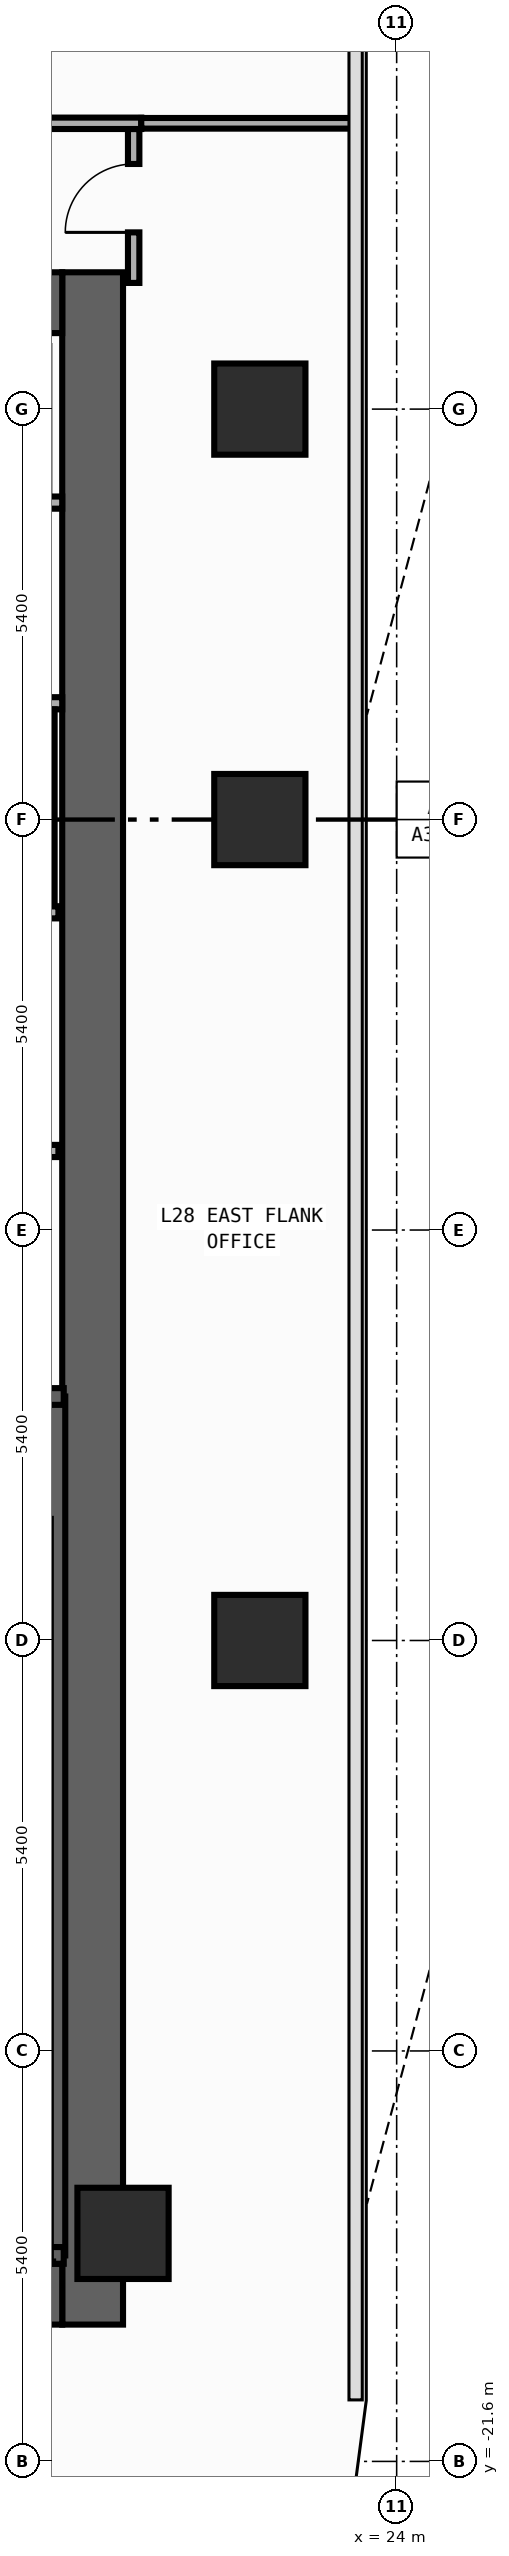
"""IFC4 building model, lengths in metres.
Left out: names, types, materials, properties, quantities, classifications, styles, units other than length and angle.
Written with IfcOpenShell. Run it as: python <this file> out.ifc"""

import sys

from ifc_helpers import new_model, si_unit, direction, frame, frame_2d, origin, origin_2d, place, context, subcontext, project, spatial, rectangle, extrude, element, fill, save


model = new_model("IFC4")
c1 = context("Model", 3, precision=1e-05, world=origin(), true_north=direction((0.0, 1.0)))
c2 = subcontext(c1, "Body", "Model", "MODEL_VIEW")
j1 = project(units=[si_unit("LENGTHUNIT", "METRE"), si_unit("PLANEANGLEUNIT", "RADIAN")], contexts=[c1])
p1 = place(None, origin())
s1 = spatial("IfcSite", under=j1, at=p1, CompositionType="ELEMENT")
p2 = place(p1, origin())
s2 = spatial("IfcBuilding", under=s1, at=p2, CompositionType="ELEMENT")
p3 = place(p2, frame((0.0, 0.0, 122.6)))
s3 = spatial("IfcBuildingStorey", under=s2, at=p3, CompositionType="ELEMENT", Elevation=122.6)
p4 = place(p3, frame((20.0, -19.8, 0.0), z_axis=(0.0, 0.0, 1.0), x_axis=(0.0, 1.0, 0.0)))
e1 = element("IfcWall", 1, at=p4, inside=s3, PredefinedType="SHEAR", context=c2, shape_type="SweptSolid", body=[
    extrude(rectangle(XDim=27.0, YDim=0.8, at=frame_2d((13.5, 0.0))), origin(), (0.0, 0.0, 1.0), 3.94),
])
for number, where, z_axis, x_axis in (
    (2, (12.8, -19.4, 0.0), (0.0, 0.0, 1.0), (1.0, 0.0, 0.0)),
    (3, (12.8, 6.8, 0.0), (0.0, 0.0, 1.0), (1.0, 0.0, 0.0)),
):
    element("IfcWall", number, at=place(p3, frame(where, z_axis=z_axis, x_axis=x_axis)), inside=s3, PredefinedType="SHEAR", context=c2, shape_type="SweptSolid", body=[
        extrude(rectangle(XDim=6.8, YDim=0.8, at=frame_2d((3.4, 0.0))), origin(), (0.0, 0.0, 1.0), 3.94),
    ])
p5 = place(p3, frame((19.53, -18.89, 0.0), z_axis=(0.0, 0.0, 1.0), x_axis=(0.0, 1.0, 0.0)))
e4 = element("IfcWall", 4, at=p5, inside=s3, PredefinedType="SHEAR", context=c2, shape_type="SweptSolid", body=[
    extrude(rectangle(XDim=11.3, YDim=0.22, at=frame_2d((5.65, 0.0))), origin(), (0.0, 0.0, 1.0), 3.94),
])
p6 = place(p3, frame((15.705, -18.89, 0.0), z_axis=(0.0, 0.0, 1.0), x_axis=(1.0, 0.0, 0.0)))
e5 = element("IfcWall", 5, at=p6, inside=s3, PredefinedType="SHEAR", context=c2, shape_type="SweptSolid", body=[
    extrude(rectangle(XDim=3.915, YDim=0.22, at=frame_2d((1.958, 0.0))), origin(), (0.0, 0.0, 1.0), 3.94),
])
p7 = place(p3, frame((19.62, -7.59, 0.0), z_axis=(0.0, 0.0, 1.0), x_axis=(-1.0, 0.0, 0.0)))
e6 = element("IfcWall", 6, at=p7, inside=s3, PredefinedType="SHEAR", context=c2, shape_type="SweptSolid", body=[
    extrude(rectangle(XDim=3.915, YDim=0.22, at=frame_2d((1.958, 0.0))), origin(), (0.0, 0.0, 1.0), 3.94),
])
p8 = place(p7, frame((1.08, 0.0, 0.0)))
e7 = element("IfcOpeningElement", 7, at=p8, cuts=e6, PredefinedType="OPENING", context=c2, shape_type="SweptSolid", body=[
    extrude(rectangle(XDim=1.1, YDim=2.2, at=frame_2d((0.55, 1.1))), frame((0.0, 0.12, 0.0), z_axis=(0.0, -1.0, 0.0), x_axis=(1.0, 0.0, 0.0)), (0.0, 0.0, 1.0), 0.24),
])
for number, where, z_axis, x_axis in (
    (8, (20.4, -18.6, 0.0), (0.0, 0.0, 1.0), (1.0, 0.0, 0.0)),
    (9, (22.2, -10.8, 0.0), (0.0, 0.0, 1.0), (1.0, 0.0, 0.0)),
    (10, (22.2, 0.0, 0.0), (0.0, 0.0, 1.0), (1.0, 0.0, 0.0)),
    (11, (22.2, 5.4, 0.0), (0.0, 0.0, 1.0), (1.0, 0.0, 0.0)),
):
    element("IfcColumn", number, at=place(p3, frame(where, z_axis=z_axis, x_axis=x_axis)), inside=s3, PredefinedType="COLUMN", context=c2, shape_type="SweptSolid", body=[
        extrude(rectangle(XDim=1.2, YDim=1.2, at=origin_2d()), origin(), (0.0, 0.0, 1.0), 4.2),
    ])
p9 = place(p3, frame((15.75, -4.36, 0.0), z_axis=(0.0, 0.0, 1.0), x_axis=(1.0, 0.0, 0.0)))
e12 = element("IfcWall", 12, at=p9, inside=s3, PredefinedType="STANDARD", context=c2, shape_type="SweptSolid", body=[
    extrude(rectangle(XDim=3.8, YDim=0.16, at=frame_2d((1.9, 0.0))), origin(), (0.0, 0.0, 1.0), 3.94),
])
p10 = place(p9, frame((1.47, 0.0, 0.0)))
e13 = element("IfcOpeningElement", 13, at=p10, cuts=e12, PredefinedType="OPENING", context=c2, shape_type="SweptSolid", body=[
    extrude(rectangle(XDim=1.15, YDim=2.2, at=frame_2d((0.575, 1.1))), frame((0.0, 0.09, 0.0), z_axis=(0.0, -1.0, 0.0), x_axis=(1.0, 0.0, 0.0)), (0.0, 0.0, 1.0), 0.18),
])
p11 = place(p3, frame((15.75, -1.22, 0.0), z_axis=(0.0, 0.0, 1.0), x_axis=(1.0, 0.0, 0.0)))
e14 = element("IfcWall", 14, at=p11, inside=s3, PredefinedType="STANDARD", context=c2, shape_type="SweptSolid", body=[
    extrude(rectangle(XDim=3.8, YDim=0.16, at=frame_2d((1.9, 0.0))), origin(), (0.0, 0.0, 1.0), 3.94),
])
for number, where, z_axis, x_axis in (
    (15, (17.31, 4.17, 0.0), (0.0, 0.0, 1.0), (1.0, 0.0, 0.0)),
    (16, (17.31, 1.53, 0.0), (0.0, 0.0, 1.0), (1.0, 0.0, 0.0)),
):
    element("IfcWall", number, at=place(p3, frame(where, z_axis=z_axis, x_axis=x_axis)), inside=s3, PredefinedType="PARTITIONING", context=c2, shape_type="SweptSolid", body=[
        extrude(rectangle(XDim=2.29, YDim=0.16, at=frame_2d((1.145, 0.0))), origin(), (0.0, 0.0, 1.0), 3.94),
    ])
p12 = place(p3, frame((20.54, 7.06, 0.0), z_axis=(0.0, 0.0, 1.0), x_axis=(0.0, 1.0, 0.0)))
e17 = element("IfcWall", 17, at=p12, inside=s3, PredefinedType="PARTITIONING", context=c2, shape_type="SweptSolid", body=[
    extrude(rectangle(XDim=2.025, YDim=0.15, at=frame_2d((1.012, 0.0))), origin(), (0.0, 0.0, 1.0), 3.94),
])
p13 = place(p12, frame((0.665, 0.0, 0.0)))
e18 = element("IfcOpeningElement", 18, at=p13, cuts=e17, PredefinedType="OPENING", context=c2, shape_type="SweptSolid", body=[
    extrude(rectangle(XDim=0.9, YDim=2.15, at=frame_2d((0.45, 1.075))), frame((0.0, 0.085, 0.0), z_axis=(0.0, -1.0, 0.0), x_axis=(1.0, 0.0, 0.0)), (0.0, 0.0, 1.0), 0.17),
])
p14 = place(p3, frame((11.81, 9.16, 0.0), z_axis=(0.0, 0.0, 1.0), x_axis=(1.0, 0.0, 0.0)))
e19 = element("IfcWall", 19, at=p14, inside=s3, PredefinedType="PARTITIONING", context=c2, shape_type="SweptSolid", body=[
    extrude(rectangle(XDim=8.83, YDim=0.15, at=frame_2d((4.415, 0.0))), origin(), (0.0, 0.0, 1.0), 3.94),
])
p15 = place(p14, frame((5.067, 0.0, 0.0)))
e20 = element("IfcOpeningElement", 20, at=p15, cuts=e19, PredefinedType="OPENING", context=c2, shape_type="SweptSolid", body=[
    extrude(rectangle(XDim=0.9, YDim=2.15, at=frame_2d((0.45, 1.075))), frame((0.0, 0.085, 0.0), z_axis=(0.0, -1.0, 0.0), x_axis=(1.0, 0.0, 0.0)), (0.0, 0.0, 1.0), 0.17),
])
p16 = place(p3, frame((20.64, 9.16, 0.0), z_axis=(0.0, 0.0, 1.0), x_axis=(1.0, 0.0, 0.0)))
e21 = element("IfcWall", 21, at=p16, inside=s3, PredefinedType="PARTITIONING", context=c2, shape_type="SweptSolid", body=[
    extrude(rectangle(XDim=2.815, YDim=0.14, at=frame_2d((1.408, 0.0))), origin(), (0.0, 0.0, 1.0), 3.94),
])
p17 = place(p3, frame((19.45, 1.45, 0.0), z_axis=(0.0, 0.0, 1.0), x_axis=(0.0, -1.0, 0.0)))
e22 = element("IfcWall", 22, at=p17, inside=s3, PredefinedType="PARTITIONING", context=c2, shape_type="SweptSolid", body=[
    extrude(rectangle(XDim=2.59, YDim=0.1, at=frame_2d((1.295, 0.0))), origin(), (0.0, 0.0, 1.0), 3.94),
])
p18 = place(p13, origin())
e23 = element("IfcDoor", 23, at=p18, inside=s3, OperationType="SINGLE_SWING_LEFT", PredefinedType="DOOR", context=c2, shape_type="SweptSolid", body=[
    extrude(rectangle(XDim=0.9, YDim=2.15, at=frame_2d((0.45, 1.075))), frame((0.0, 0.025, 0.0), z_axis=(0.0, -1.0, 0.0), x_axis=(1.0, 0.0, 0.0)), (0.0, 0.0, 1.0), 0.05),
])
fill(e18, e23)
save(model, sys.argv[1])
